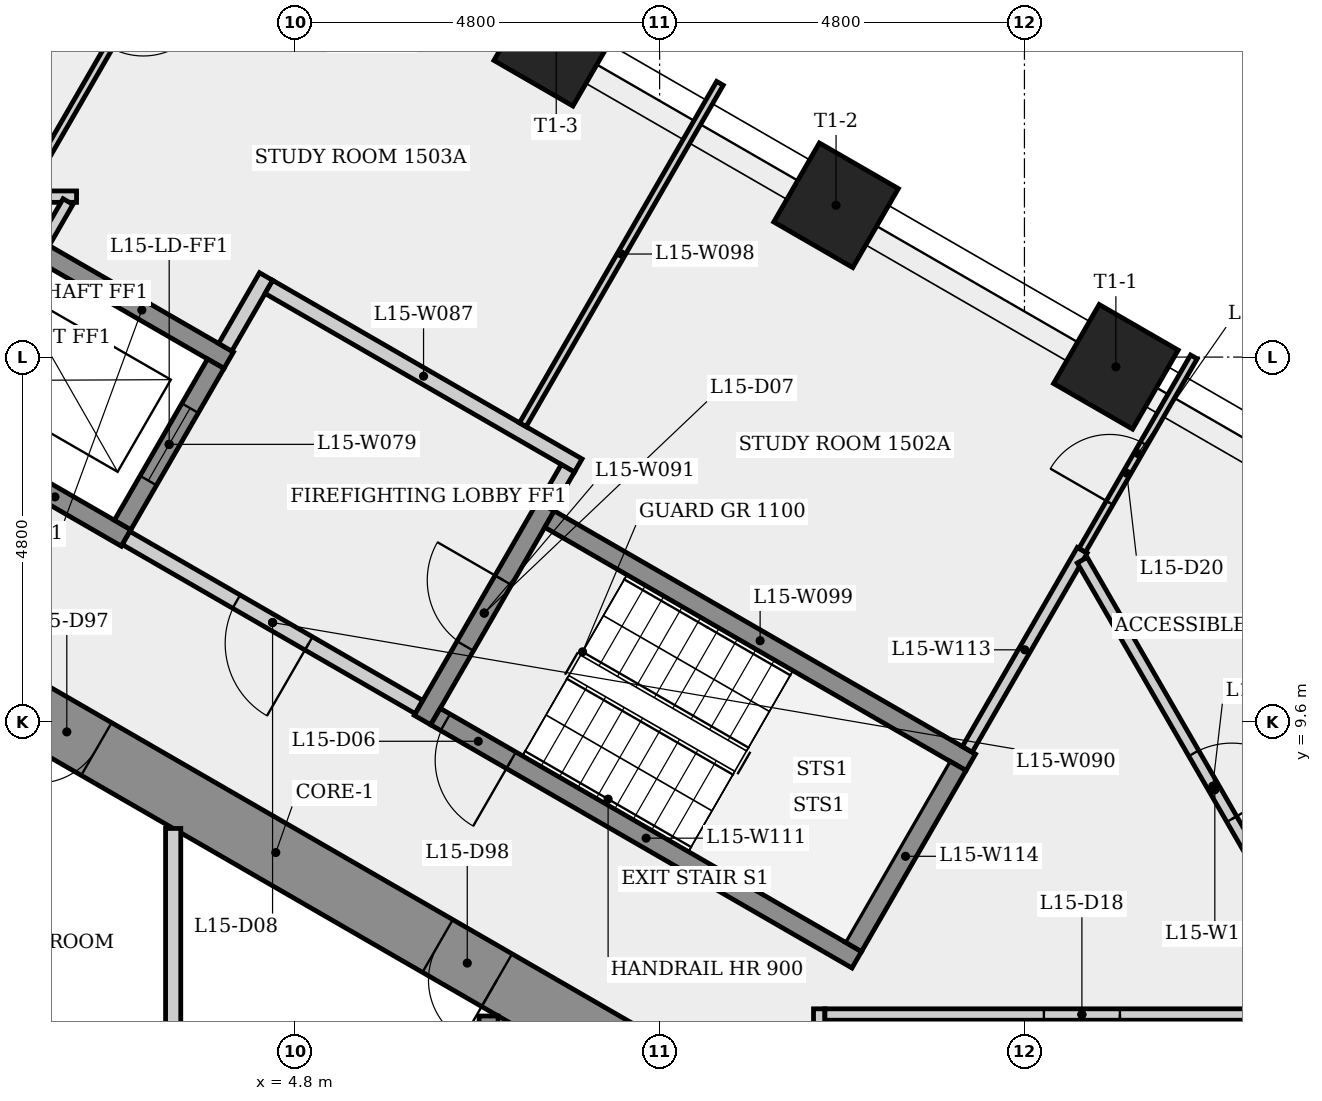
"""IFC4 building model, lengths in metres.
Left out: names, types, materials, properties, quantities, classifications, styles, units other than length and angle.
Written with IfcOpenShell. Run it as: python <this file> out.ifc"""

import sys

from ifc_helpers import new_model, si_unit, direction, frame, frame_2d, origin, origin_2d, place, context, subcontext, project, spatial, rectangle, extrude, element, fill, save


model = new_model("IFC4")
c1 = context("Model", 3, precision=1e-05, world=origin(), true_north=direction((0.0, 1.0)))
c2 = subcontext(c1, "Body", "Model", "MODEL_VIEW")
j1 = project(units=[si_unit("LENGTHUNIT", "METRE"), si_unit("PLANEANGLEUNIT", "RADIAN")], contexts=[c1])
p1 = place(None, origin())
s1 = spatial("IfcSite", under=j1, at=p1, CompositionType="ELEMENT")
p2 = place(p1, origin())
s2 = spatial("IfcBuilding", under=s1, at=p2, CompositionType="ELEMENT")
p3 = place(p2, frame((0.0, 0.0, 59.5)))
s3 = spatial("IfcBuildingStorey", under=s2, at=p3, CompositionType="ELEMENT", Elevation=59.5)
p4 = place(p3, frame((9.3, 5.138, 0.0), z_axis=(0.0, 0.0, 1.0), x_axis=(-0.866023993627, 0.500002442456, 0.0)))
e1 = element("IfcWall", 1, at=p4, inside=s3, PredefinedType="SHEAR", context=c2, shape_type="SweptSolid", body=[
    extrude(rectangle(XDim=10.97, YDim=0.8, at=frame_2d((5.485, 0.0))), origin(), (0.0, 0.0, 1.0), 3.4),
])
p5 = place(p4, frame((8.21, 0.0, 0.0)))
e2 = element("IfcOpeningElement", 2, at=p5, cuts=e1, PredefinedType="OPENING", context=c2, shape_type="SweptSolid", body=[
    extrude(rectangle(XDim=0.9, YDim=2.1, at=frame_2d((0.45, 1.05))), frame((0.0, 0.41, 0.0), z_axis=(0.0, -1.0, 0.0), x_axis=(1.0, 0.0, 0.0)), (0.0, 0.0, 1.0), 0.82),
])
p6 = place(p4, frame((2.126, 0.0, 0.0)))
e3 = element("IfcOpeningElement", 3, at=p6, cuts=e1, PredefinedType="OPENING", context=c2, shape_type="SweptSolid", body=[
    extrude(rectangle(XDim=0.9, YDim=2.1, at=frame_2d((0.45, 1.05))), frame((0.0, 0.41, 0.0), z_axis=(0.0, -1.0, 0.0), x_axis=(1.0, 0.0, 0.0)), (0.0, 0.0, 1.0), 0.82),
])
for number, where, z_axis, x_axis in (
    (4, (15.603, 14.272, 0.0), (0.0, 0.0, 1.0), (0.5, 0.866, 0.0)),
    (5, (11.921, 16.397, 0.0), (0.0, 0.0, 1.0), (0.5, 0.866, 0.0)),
    (6, (8.24, 18.523, 0.0), (0.0, 0.0, 1.0), (0.5, 0.866, 0.0)),
):
    element("IfcColumn", number, at=place(p3, frame(where, z_axis=z_axis, x_axis=x_axis)), inside=s3, PredefinedType="COLUMN", context=c2, shape_type="SweptSolid", body=[
        extrude(rectangle(XDim=1.2, YDim=1.2, at=origin_2d()), origin(), (0.0, 0.0, 1.0), 3.4),
    ])
p7 = place(p3, frame((1.073, 16.008, 0.0), z_axis=(0.0, 0.0, 1.0), x_axis=(0.866040211805, -0.499974350878, 0.0)))
e7 = element("IfcWall", 7, at=p7, inside=s3, PredefinedType="SHEAR", context=c2, shape_type="SweptSolid", body=[
    extrude(rectangle(XDim=3.3, YDim=0.25, at=frame_2d((1.65, 0.0))), origin(), (0.0, 0.0, 1.0), 3.05),
])
p8 = place(p3, frame((1.174, 16.511, 0.0), z_axis=(0.0, 0.0, 1.0), x_axis=(1.0, 0.0, 0.0)))
e8 = element("IfcWall", 8, at=p8, inside=s3, PredefinedType="PARTITIONING", context=c2, shape_type="SweptSolid", body=[
    extrude(rectangle(XDim=0.755, YDim=0.15, at=frame_2d((0.377, 0.0))), origin(), (0.0, 0.0, 1.0), 3.05),
])
p9 = place(p3, frame((1.816, 16.446, 0.0), z_axis=(0.0, 0.0, 1.0), x_axis=(-0.50008261738, -0.865977699363, 0.0)))
e9 = element("IfcWall", 9, at=p9, inside=s3, PredefinedType="PARTITIONING", context=c2, shape_type="SweptSolid", body=[
    extrude(rectangle(XDim=0.626, YDim=0.15, at=frame_2d((0.313, 0.0))), origin(), (0.0, 0.0, 1.0), 3.05),
])
p10 = place(p3, frame((2.581, 12.02, 0.0), z_axis=(0.0, 0.0, 1.0), x_axis=(-0.86603892542, 0.499976579108, 0.0)))
e10 = element("IfcWall", 10, at=p10, inside=s3, PredefinedType="SHEAR", context=c2, shape_type="SweptSolid", body=[
    extrude(rectangle(XDim=2.162, YDim=0.25, at=frame_2d((1.081, 0.0))), origin(), (0.0, 0.0, 1.0), 3.05),
])
p11 = place(p3, frame((2.535, 12.191, 0.0), z_axis=(0.0, 0.0, 1.0), x_axis=(0.500061746146, 0.865989751695, 0.0)))
e11 = element("IfcWall", 11, at=p11, inside=s3, PredefinedType="SHEAR", context=c2, shape_type="SweptSolid", body=[
    extrude(rectangle(XDim=2.45, YDim=0.25, at=frame_2d((1.225, 0.0))), origin(), (0.0, 0.0, 1.0), 3.4),
])
p12 = place(p11, frame((0.675, 0.0, 0.0)))
e12 = element("IfcOpeningElement", 12, at=p12, cuts=e11, PredefinedType="OPENING", context=c2, shape_type="SweptSolid", body=[
    extrude(rectangle(XDim=1.1, YDim=2.1, at=frame_2d((0.55, 1.05))), frame((0.0, 0.135, 0.0), z_axis=(0.0, -1.0, 0.0), x_axis=(1.0, 0.0, 0.0)), (0.0, 0.0, 1.0), 0.27),
])
p13 = place(p3, frame((3.2, 8.198, 0.0), z_axis=(0.0, 0.0, 1.0), x_axis=(0.0, -1.0, 0.0)))
e13 = element("IfcWall", 13, at=p13, inside=s3, PredefinedType="PARTITIONING", context=c2, shape_type="SweptSolid", body=[
    extrude(rectangle(XDim=2.924, YDim=0.2, at=frame_2d((1.462, 0.0))), origin(), (0.0, 0.0, 1.0), 3.05),
])
p14 = place(p3, frame((3.885, 14.529, 0.0), z_axis=(0.0, 0.0, 1.0), x_axis=(0.499997628298, 0.866026773083, 0.0)))
e14 = element("IfcWall", 14, at=p14, inside=s3, PredefinedType="PARTITIONING", context=c2, shape_type="SweptSolid", body=[
    extrude(rectangle(XDim=1.075, YDim=0.2, at=frame_2d((0.538, 0.0))), origin(), (0.0, 0.0, 1.0), 3.05),
])
p15 = place(p3, frame((4.158, 21.602, 0.0), z_axis=(0.0, 0.0, 1.0), x_axis=(-0.500002556202, -0.866023927955, 0.0)))
e15 = element("IfcWall", 15, at=p15, inside=s3, PredefinedType="PARTITIONING", context=c2, shape_type="SweptSolid", body=[
    extrude(rectangle(XDim=5.709, YDim=0.1, at=frame_2d((2.854, 0.0))), origin(), (0.0, 0.0, 1.0), 3.05),
])
p16 = place(p15, frame((2.702, 0.0, 0.0)))
e16 = element("IfcOpeningElement", 16, at=p16, cuts=e15, PredefinedType="OPENING", context=c2, shape_type="SweptSolid", body=[
    extrude(rectangle(XDim=0.9, YDim=2.1, at=frame_2d((0.45, 1.05))), frame((0.0, 0.06, 0.0), z_axis=(0.0, -1.0, 0.0), x_axis=(1.0, 0.0, 0.0)), (0.0, 0.0, 1.0), 0.12),
])
p17 = place(p3, frame((4.459, 15.323, 0.0), z_axis=(0.0, 0.0, 1.0), x_axis=(0.866016039709, -0.500016218704, 0.0)))
e17 = element("IfcWall", 17, at=p17, inside=s3, PredefinedType="PARTITIONING", context=c2, shape_type="SweptSolid", body=[
    extrude(rectangle(XDim=4.7, YDim=0.2, at=frame_2d((2.35, 0.0))), origin(), (0.0, 0.0, 1.0), 3.05),
])
p18 = place(p3, frame((6.435, 9.795, 0.0), z_axis=(0.0, 0.0, 1.0), x_axis=(-0.866012907634, 0.500021643343, 0.0)))
e18 = element("IfcWall", 18, at=p18, inside=s3, PredefinedType="PARTITIONING", context=c2, shape_type="SweptSolid", body=[
    extrude(rectangle(XDim=4.45, YDim=0.2, at=frame_2d((2.225, 0.0))), origin(), (0.0, 0.0, 1.0), 3.05),
])
p19 = place(p18, frame((1.675, 0.0, 0.0)))
e19 = element("IfcOpeningElement", 19, at=p19, cuts=e18, PredefinedType="OPENING", context=c2, shape_type="SweptSolid", body=[
    extrude(rectangle(XDim=1.1, YDim=2.1, at=frame_2d((0.55, 1.05))), frame((0.0, 0.11, 0.0), z_axis=(0.0, -1.0, 0.0), x_axis=(1.0, 0.0, 0.0)), (0.0, 0.0, 1.0), 0.22),
])
p20 = place(p3, frame((6.48, 9.624, 0.0), z_axis=(0.0, 0.0, 1.0), x_axis=(0.500017246033, 0.866015446554, 0.0)))
e20 = element("IfcWall", 20, at=p20, inside=s3, PredefinedType="SHEAR", context=c2, shape_type="SweptSolid", body=[
    extrude(rectangle(XDim=3.25, YDim=0.25, at=frame_2d((1.625, 0.0))), origin(), (0.0, 0.0, 1.0), 3.05),
])
p21 = place(p20, frame((1.125, 0.0, 0.0)))
e21 = element("IfcOpeningElement", 21, at=p21, cuts=e20, PredefinedType="OPENING", context=c2, shape_type="SweptSolid", body=[
    extrude(rectangle(XDim=1.0, YDim=2.1, at=frame_2d((0.5, 1.05))), frame((0.0, 0.135, 0.0), z_axis=(0.0, -1.0, 0.0), x_axis=(1.0, 0.0, 0.0)), (0.0, 0.0, 1.0), 0.27),
])
p22 = place(p3, frame((7.35, 5.73, 0.0), z_axis=(0.0, 0.0, 1.0), x_axis=(0.0, -1.0, 0.0)))
e22 = element("IfcWall", 22, at=p22, inside=s3, PredefinedType="SHEAR", context=c2, shape_type="SweptSolid", body=[
    extrude(rectangle(XDim=3.805, YDim=0.25, at=frame_2d((1.903, 0.0))), origin(), (0.0, 0.0, 1.0), 3.05),
])
p23 = place(p3, frame((7.8, 13.51, 0.0), z_axis=(0.0, 0.0, 1.0), x_axis=(0.499991353094, 0.866030396021, 0.0)))
e23 = element("IfcWall", 23, at=p23, inside=s3, PredefinedType="PARTITIONING", context=c2, shape_type="SweptSolid", body=[
    extrude(rectangle(XDim=5.187, YDim=0.1, at=frame_2d((2.594, 0.0))), origin(), (0.0, 0.0, 1.0), 3.05),
])
p24 = place(p3, frame((8.151, 12.268, 0.0), z_axis=(0.0, 0.0, 1.0), x_axis=(0.866025499775, -0.499999833739, 0.0)))
e24 = element("IfcWall", 24, at=p24, inside=s3, PredefinedType="SHEAR", context=c2, shape_type="SweptSolid", body=[
    extrude(rectangle(XDim=6.4, YDim=0.25, at=frame_2d((3.2, 0.0))), origin(), (0.0, 0.0, 1.0), 3.05),
])
p25 = place(p3, frame((8.393, 12.937, 0.0), z_axis=(0.0, 0.0, 1.0), x_axis=(-0.500065409566, -0.86598763626, 0.0)))
e25 = element("IfcWall", 25, at=p25, inside=s3, PredefinedType="PARTITIONING", context=c2, shape_type="SweptSolid", body=[
    extrude(rectangle(XDim=0.575, YDim=0.2, at=frame_2d((0.288, 0.0))), origin(), (0.0, 0.0, 1.0), 3.05),
])
p26 = place(p3, frame((11.7, -5.675, 0.0), z_axis=(0.0, 0.0, 1.0), x_axis=(0.0, 1.0, 0.0)))
e26 = element("IfcWall", 26, at=p26, inside=s3, PredefinedType="PARTITIONING", context=c2, shape_type="SweptSolid", body=[
    extrude(rectangle(XDim=11.499, YDim=0.15, at=frame_2d((5.75, 0.0))), origin(), (0.0, 0.0, 1.0), 3.05),
])
p27 = place(p26, frame((1.862, 0.0, 0.0)))
e27 = element("IfcOpeningElement", 27, at=p27, cuts=e26, PredefinedType="OPENING", context=c2, shape_type="SweptSolid", body=[
    extrude(rectangle(XDim=1.0, YDim=2.1, at=frame_2d((0.5, 1.05))), frame((0.0, 0.085, 0.0), z_axis=(0.0, -1.0, 0.0), x_axis=(1.0, 0.0, 0.0)), (0.0, 0.0, 1.0), 0.17),
])
p28 = place(p3, frame((12.194, 6.47, 0.0), z_axis=(0.0, 0.0, 1.0), x_axis=(-0.866025499775, 0.499999833739, 0.0)))
e28 = element("IfcWall", 28, at=p28, inside=s3, PredefinedType="SHEAR", context=c2, shape_type="SweptSolid", body=[
    extrude(rectangle(XDim=6.4, YDim=0.25, at=frame_2d((3.2, 0.0))), origin(), (0.0, 0.0, 1.0), 3.05),
])
p29 = place(p28, frame((5.25, 0.0, 0.0)))
e29 = element("IfcOpeningElement", 29, at=p29, cuts=e28, PredefinedType="OPENING", context=c2, shape_type="SweptSolid", body=[
    extrude(rectangle(XDim=1.0, YDim=2.1, at=frame_2d((0.5, 1.05))), frame((0.0, 0.135, 0.0), z_axis=(0.0, -1.0, 0.0), x_axis=(1.0, 0.0, 0.0)), (0.0, 0.0, 1.0), 0.27),
])
p30 = place(p3, frame((13.648, 9.239, 0.0), z_axis=(0.0, 0.0, 1.0), x_axis=(0.500036864363, 0.866004119088, 0.0)))
e30 = element("IfcWall", 30, at=p30, inside=s3, PredefinedType="PARTITIONING", context=c2, shape_type="SweptSolid", body=[
    extrude(rectangle(XDim=3.025, YDim=0.15, at=frame_2d((1.512, 0.0))), origin(), (0.0, 0.0, 1.0), 3.05),
])
p31 = place(p3, frame((13.523, 9.022, 0.0), z_axis=(0.0, 0.0, 1.0), x_axis=(-0.500034990121, -0.866005201286, 0.0)))
e31 = element("IfcWall", 31, at=p31, inside=s3, PredefinedType="SHEAR", context=c2, shape_type="SweptSolid", body=[
    extrude(rectangle(XDim=2.75, YDim=0.25, at=frame_2d((1.375, 0.0))), origin(), (0.0, 0.0, 1.0), 3.05),
])
p32 = place(p3, frame((15.16, 11.858, 0.0), z_axis=(0.0, 0.0, 1.0), x_axis=(0.500000635496, 0.86602503688, 0.0)))
e32 = element("IfcWall", 32, at=p32, inside=s3, PredefinedType="PARTITIONING", context=c2, shape_type="SweptSolid", body=[
    extrude(rectangle(XDim=2.938, YDim=0.1, at=frame_2d((1.469, 0.0))), origin(), (0.0, 0.0, 1.0), 3.05),
])
p33 = place(p32, frame((0.721, 0.0, 0.0)))
e33 = element("IfcOpeningElement", 33, at=p33, cuts=e32, PredefinedType="OPENING", context=c2, shape_type="SweptSolid", body=[
    extrude(rectangle(XDim=0.9, YDim=2.1, at=frame_2d((0.45, 1.05))), frame((0.0, 0.06, 0.0), z_axis=(0.0, -1.0, 0.0), x_axis=(1.0, 0.0, 0.0)), (0.0, 0.0, 1.0), 0.12),
])
p34 = place(p3, frame((15.16, 11.728, 0.0), z_axis=(0.0, 0.0, 1.0), x_axis=(0.499991973402, -0.866030037893, 0.0)))
e34 = element("IfcWall", 34, at=p34, inside=s3, PredefinedType="PARTITIONING", context=c2, shape_type="SweptSolid", body=[
    extrude(rectangle(XDim=6.979, YDim=0.15, at=frame_2d((3.489, 0.0))), origin(), (0.0, 0.0, 1.0), 3.05),
])
p35 = place(p34, frame((2.935, 0.0, 0.0)))
e35 = element("IfcOpeningElement", 35, at=p35, cuts=e34, PredefinedType="OPENING", context=c2, shape_type="SweptSolid", body=[
    extrude(rectangle(XDim=1.0, YDim=2.1, at=frame_2d((0.5, 1.05))), frame((0.0, 0.085, 0.0), z_axis=(0.0, -1.0, 0.0), x_axis=(1.0, 0.0, 0.0)), (0.0, 0.0, 1.0), 0.17),
])
p36 = place(p3, frame((18.537, 5.75, 0.0), z_axis=(0.0, 0.0, 1.0), x_axis=(-1.0, 0.0, 0.0)))
e36 = element("IfcWall", 36, at=p36, inside=s3, PredefinedType="PARTITIONING", context=c2, shape_type="SweptSolid", body=[
    extrude(rectangle(XDim=6.762, YDim=0.15, at=frame_2d((3.381, 0.0))), origin(), (0.0, 0.0, 1.0), 3.05),
])
p37 = place(p36, frame((2.881, 0.0, 0.0)))
e37 = element("IfcOpeningElement", 37, at=p37, cuts=e36, PredefinedType="OPENING", context=c2, shape_type="SweptSolid", body=[
    extrude(rectangle(XDim=1.0, YDim=2.1, at=frame_2d((0.5, 1.05))), frame((0.0, 0.085, 0.0), z_axis=(0.0, -1.0, 0.0), x_axis=(1.0, 0.0, 0.0)), (0.0, 0.0, 1.0), 0.17),
])
p38 = place(p29, origin())
e38 = element("IfcDoor", 38, at=p38, inside=s3, OperationType="SINGLE_SWING_LEFT", PredefinedType="DOOR", context=c2, shape_type="SweptSolid", body=[
    extrude(rectangle(XDim=1.0, YDim=2.1, at=frame_2d((0.5, 1.05))), frame((0.0, 0.025, 0.0), z_axis=(0.0, -1.0, 0.0), x_axis=(1.0, 0.0, 0.0)), (0.0, 0.0, 1.0), 0.05),
])
fill(e29, e38)
p39 = place(p21, origin())
e39 = element("IfcDoor", 39, at=p39, inside=s3, OperationType="SINGLE_SWING_RIGHT", PredefinedType="DOOR", context=c2, shape_type="SweptSolid", body=[
    extrude(rectangle(XDim=1.0, YDim=2.1, at=frame_2d((0.5, 1.05))), frame((0.0, 0.025, 0.0), z_axis=(0.0, -1.0, 0.0), x_axis=(1.0, 0.0, 0.0)), (0.0, 0.0, 1.0), 0.05),
])
fill(e21, e39)
p40 = place(p19, origin())
e40 = element("IfcDoor", 40, at=p40, inside=s3, OperationType="SINGLE_SWING_LEFT", PredefinedType="DOOR", context=c2, shape_type="SweptSolid", body=[
    extrude(rectangle(XDim=1.1, YDim=2.1, at=frame_2d((0.55, 1.05))), frame((0.0, 0.025, 0.0), z_axis=(0.0, -1.0, 0.0), x_axis=(1.0, 0.0, 0.0)), (0.0, 0.0, 1.0), 0.05),
])
fill(e19, e40)
p41 = place(p12, origin())
e41 = element("IfcDoor", 41, at=p41, inside=s3, OperationType="SLIDING_TO_LEFT", PredefinedType="DOOR", context=c2, shape_type="SweptSolid", body=[
    extrude(rectangle(XDim=1.1, YDim=2.1, at=frame_2d((0.55, 1.05))), frame((0.0, 0.025, 0.0), z_axis=(0.0, -1.0, 0.0), x_axis=(1.0, 0.0, 0.0)), (0.0, 0.0, 1.0), 0.05),
])
fill(e12, e41)
p42 = place(p37, origin())
e42 = element("IfcDoor", 42, at=p42, inside=s3, OperationType="SINGLE_SWING_LEFT", PredefinedType="DOOR", context=c2, shape_type="SweptSolid", body=[
    extrude(rectangle(XDim=1.0, YDim=2.1, at=frame_2d((0.5, 1.05))), frame((0.0, 0.025, 0.0), z_axis=(0.0, -1.0, 0.0), x_axis=(1.0, 0.0, 0.0)), (0.0, 0.0, 1.0), 0.05),
])
fill(e37, e42)
p43 = place(p35, origin())
e43 = element("IfcDoor", 43, at=p43, inside=s3, OperationType="SINGLE_SWING_RIGHT", PredefinedType="DOOR", context=c2, shape_type="SweptSolid", body=[
    extrude(rectangle(XDim=1.0, YDim=2.1, at=frame_2d((0.5, 1.05))), frame((0.0, 0.025, 0.0), z_axis=(0.0, -1.0, 0.0), x_axis=(1.0, 0.0, 0.0)), (0.0, 0.0, 1.0), 0.05),
])
fill(e35, e43)
p44 = place(p33, origin())
e44 = element("IfcDoor", 44, at=p44, inside=s3, OperationType="SINGLE_SWING_LEFT", PredefinedType="DOOR", context=c2, shape_type="SweptSolid", body=[
    extrude(rectangle(XDim=0.9, YDim=2.1, at=frame_2d((0.45, 1.05))), frame((0.0, 0.025, 0.0), z_axis=(0.0, -1.0, 0.0), x_axis=(1.0, 0.0, 0.0)), (0.0, 0.0, 1.0), 0.05),
])
fill(e33, e44)
p45 = place(p5, origin())
e45 = element("IfcDoor", 45, at=p45, inside=s3, OperationType="SINGLE_SWING_RIGHT", PredefinedType="DOOR", context=c2, shape_type="SweptSolid", body=[
    extrude(rectangle(XDim=0.9, YDim=2.1, at=frame_2d((0.45, 1.05))), frame((0.0, 0.025, 0.0), z_axis=(0.0, -1.0, 0.0), x_axis=(1.0, 0.0, 0.0)), (0.0, 0.0, 1.0), 0.05),
])
fill(e2, e45)
p46 = place(p6, origin())
e46 = element("IfcDoor", 46, at=p46, inside=s3, OperationType="SINGLE_SWING_LEFT", PredefinedType="DOOR", context=c2, shape_type="SweptSolid", body=[
    extrude(rectangle(XDim=0.9, YDim=2.1, at=frame_2d((0.45, 1.05))), frame((0.0, 0.025, 0.0), z_axis=(0.0, -1.0, 0.0), x_axis=(1.0, 0.0, 0.0)), (0.0, 0.0, 1.0), 0.05),
])
fill(e3, e46)
save(model, sys.argv[1])
